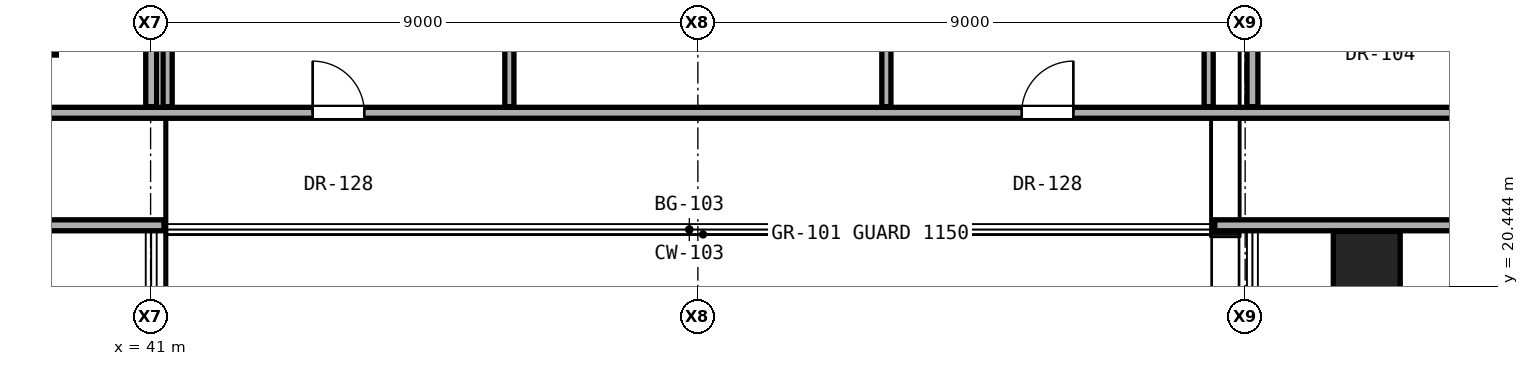
"""IFC4 building model, lengths in metres.
Left out: names, types, materials, properties, quantities, classifications, styles, units other than length and angle.
Written with IfcOpenShell. Run it as: python <this file> out.ifc"""

import sys

from ifc_helpers import new_model, si_unit, direction, frame, frame_2d, origin, origin_2d, place, context, subcontext, project, spatial, rectangle, hollow_rectangle, extrude, element, fill, save


model = new_model("IFC4")
c1 = context("Model", 3, precision=1e-05, world=origin(), true_north=direction((0.0, 1.0)))
c2 = subcontext(c1, "Body", "Model", "MODEL_VIEW")
j1 = project(units=[si_unit("LENGTHUNIT", "METRE"), si_unit("PLANEANGLEUNIT", "RADIAN")], contexts=[c1])
p1 = place(None, origin())
s1 = spatial("IfcSite", under=j1, at=p1, CompositionType="ELEMENT")
p2 = place(p1, origin())
s2 = spatial("IfcBuilding", under=s1, at=p2, CompositionType="ELEMENT")
p3 = place(p2, frame((0.0, 0.0, 91.7)))
s3 = spatial("IfcBuildingStorey", under=s2, at=p3, CompositionType="ELEMENT", Elevation=91.7)
for number, where, z_axis, x_axis in (
    (1, (38.9, 24.8, 0.0), (0.0, 0.0, 1.0), (1.0, 0.0, 0.0)),
    (2, (61.0, 20.8, 0.0), (0.0, 0.0, 1.0), (1.0, 0.0, 0.0)),
):
    element("IfcColumn", number, at=place(p3, frame(where, z_axis=z_axis, x_axis=x_axis)), inside=s3, PredefinedType="COLUMN", context=c2, shape_type="SweptSolid", body=[
        extrude(hollow_rectangle(XDim=1.1, YDim=1.1, WallThickness=0.06, at=origin_2d()), origin(), (0.0, 0.0, 1.0), 3.3),
    ])
p4 = place(p3, frame((32.14, 21.45, 0.0), z_axis=(0.0, 0.0, 1.0), x_axis=(1.0, 0.0, 0.0)))
e3 = element("IfcWall", 3, at=p4, inside=s3, PredefinedType="PARTITIONING", context=c2, shape_type="SweptSolid", body=[
    extrude(rectangle(XDim=9.08, YDim=0.18, at=frame_2d((4.54, 0.0))), origin(), (0.0, 0.0, 1.0), 2.085),
])
p5 = place(p3, frame((58.5, 21.45, 0.0), z_axis=(0.0, 0.0, 1.0), x_axis=(1.0, 0.0, 0.0)))
e4 = element("IfcWall", 4, at=p5, inside=s3, PredefinedType="PARTITIONING", context=c2, shape_type="SweptSolid", body=[
    extrude(rectangle(XDim=6.75, YDim=0.18, at=frame_2d((3.375, 0.0))), origin(), (0.0, 0.0, 1.0), 2.085),
])
p6 = place(p5, frame((4.355, 0.0, 0.0)))
e5 = element("IfcOpeningElement", 5, at=p6, cuts=e4, PredefinedType="OPENING", context=c2, shape_type="SweptSolid", body=[
    extrude(rectangle(XDim=0.85, YDim=2.01, at=frame_2d((0.425, 1.005))), frame((0.0, 0.1, 0.0), z_axis=(0.0, -1.0, 0.0), x_axis=(1.0, 0.0, 0.0)), (0.0, 0.0, 1.0), 0.2),
])
p7 = place(p3, frame((32.14, 23.3, 0.0), z_axis=(0.0, 0.0, 1.0), x_axis=(1.0, 0.0, 0.0)))
e6 = element("IfcWall", 6, at=p7, inside=s3, PredefinedType="PARTITIONING", context=c2, shape_type="SweptSolid", body=[
    extrude(rectangle(XDim=33.11, YDim=0.18, at=frame_2d((16.555, 0.0))), origin(), (0.0, 0.0, 1.0), 2.145),
])
p8 = place(p7, frame((11.525, 0.0, 0.0)))
e7 = element("IfcOpeningElement", 7, at=p8, cuts=e6, PredefinedType="OPENING", context=c2, shape_type="SweptSolid", body=[
    extrude(rectangle(XDim=0.85, YDim=2.01, at=frame_2d((0.425, 1.005))), frame((0.0, 0.1, 0.0), z_axis=(0.0, -1.0, 0.0), x_axis=(1.0, 0.0, 0.0)), (0.0, 0.0, 1.0), 0.2),
])
p9 = place(p7, frame((23.185, 0.0, 0.0)))
e8 = element("IfcOpeningElement", 8, at=p9, cuts=e6, PredefinedType="OPENING", context=c2, shape_type="SweptSolid", body=[
    extrude(rectangle(XDim=0.85, YDim=2.01, at=frame_2d((0.425, 1.005))), frame((0.0, 0.1, 0.0), z_axis=(0.0, -1.0, 0.0), x_axis=(1.0, 0.0, 0.0)), (0.0, 0.0, 1.0), 0.2),
])
p10 = place(p3, frame((41.01, 23.4, 0.0), z_axis=(0.0, 0.0, 1.0), x_axis=(0.0, 1.0, 0.0)))
e9 = element("IfcWall", 9, at=p10, inside=s3, PredefinedType="PARTITIONING", context=c2, shape_type="SweptSolid", body=[
    extrude(rectangle(XDim=5.4, YDim=0.18, at=frame_2d((2.7, 0.0))), origin(), (0.0, 0.0, 1.0), 2.085),
])
for number, where, z_axis, x_axis in (
    (10, (41.28, 23.4, 0.0), (0.0, 0.0, 1.0), (0.0, 1.0, 0.0)),
    (11, (46.9, 23.4, 0.0), (0.0, 0.0, 1.0), (0.0, 1.0, 0.0)),
    (12, (53.1, 23.4, 0.0), (0.0, 0.0, 1.0), (0.0, 1.0, 0.0)),
    (13, (58.4, 23.4, 0.0), (0.0, 0.0, 1.0), (0.0, 1.0, 0.0)),
):
    element("IfcWall", number, at=place(p3, frame(where, z_axis=z_axis, x_axis=x_axis)), inside=s3, PredefinedType="PARTITIONING", context=c2, shape_type="SweptSolid", body=[
        extrude(rectangle(XDim=9.065, YDim=0.15, at=frame_2d((4.533, 0.0))), origin(), (0.0, 0.0, 1.0), 2.085),
    ])
p11 = place(p3, frame((59.12, 23.4, 0.0), z_axis=(0.0, 0.0, 1.0), x_axis=(0.0, 1.0, 0.0)))
e14 = element("IfcWall", 14, at=p11, inside=s3, PredefinedType="PARTITIONING", context=c2, shape_type="SweptSolid", body=[
    extrude(rectangle(XDim=1.924, YDim=0.18, at=frame_2d((0.962, 0.0))), origin(), (0.0, 0.0, 1.0), 3.08),
])
p12 = place(p8, origin())
e15 = element("IfcDoor", 15, at=p12, inside=s3, OperationType="SINGLE_SWING_LEFT", PredefinedType="DOOR", context=c2, shape_type="SweptSolid", body=[
    extrude(rectangle(XDim=0.85, YDim=2.01, at=frame_2d((0.425, 1.005))), frame((0.0, 0.025, 0.0), z_axis=(0.0, -1.0, 0.0), x_axis=(1.0, 0.0, 0.0)), (0.0, 0.0, 1.0), 0.05),
])
fill(e7, e15)
p13 = place(p9, origin())
e16 = element("IfcDoor", 16, at=p13, inside=s3, OperationType="SINGLE_SWING_RIGHT", PredefinedType="DOOR", context=c2, shape_type="SweptSolid", body=[
    extrude(rectangle(XDim=0.85, YDim=2.01, at=frame_2d((0.425, 1.005))), frame((0.0, 0.025, 0.0), z_axis=(0.0, -1.0, 0.0), x_axis=(1.0, 0.0, 0.0)), (0.0, 0.0, 1.0), 0.05),
])
fill(e8, e16)
save(model, sys.argv[1])
